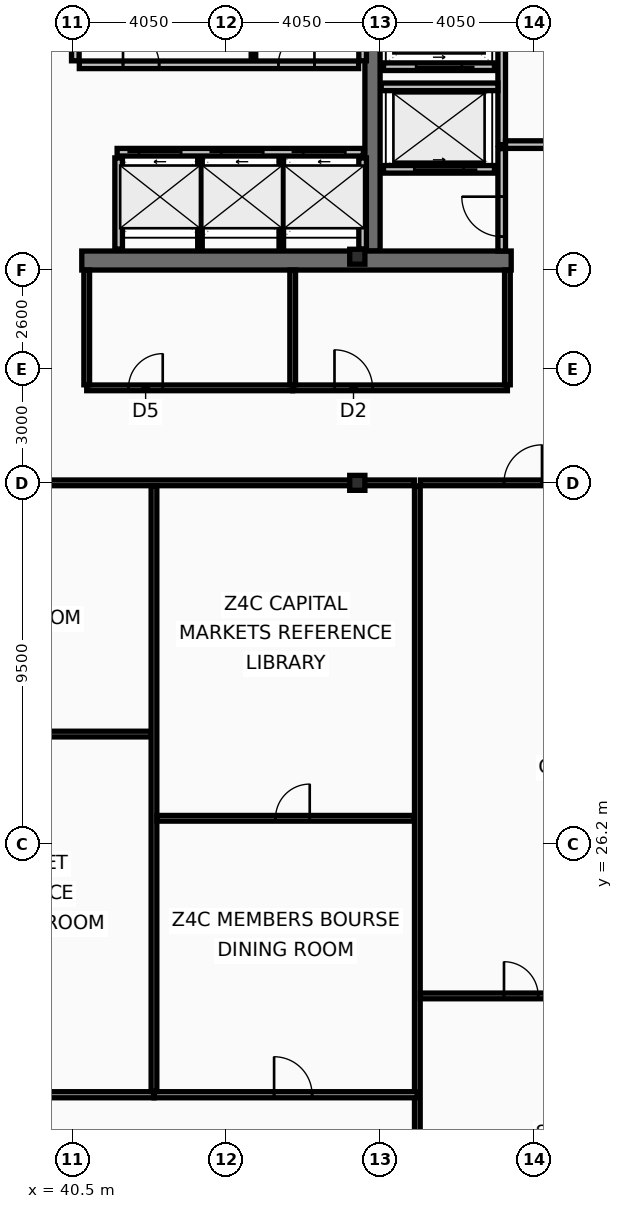
"""IFC4 building model, lengths in metres.
Left out: names, types, materials, properties, quantities, classifications, styles, units other than length and angle.
Written with IfcOpenShell. Run it as: python <this file> out.ifc"""

import sys

from ifc_helpers import new_model, si_unit, direction, frame, frame_2d, origin, origin_2d, place, context, subcontext, project, spatial, rectangle, i_section, extrude, element, fill, save


model = new_model("IFC4")
c1 = context("Model", 3, precision=1e-05, world=origin(), true_north=direction((0.0, 1.0)))
c2 = subcontext(c1, "Body", "Model", "MODEL_VIEW")
j1 = project(units=[si_unit("LENGTHUNIT", "METRE"), si_unit("PLANEANGLEUNIT", "RADIAN")], contexts=[c1])
p1 = place(None, origin())
s1 = spatial("IfcSite", under=j1, at=p1, CompositionType="ELEMENT")
p2 = place(p1, origin())
s2 = spatial("IfcBuilding", under=s1, at=p2, CompositionType="ELEMENT")
p3 = place(p2, frame((0.0, 0.0, 314.6)))
s3 = spatial("IfcBuildingStorey", under=s2, at=p3, CompositionType="ELEMENT", Elevation=314.6)
p4 = place(p3, frame((48.4, 41.8, 0.0), z_axis=(0.0, 0.0, 1.0), x_axis=(0.0, 1.0, 0.0)))
e1 = element("IfcWall", 1, at=p4, inside=s3, PredefinedType="SHEAR", context=c2, shape_type="SweptSolid", body=[
    extrude(rectangle(XDim=11.4, YDim=0.4, at=frame_2d((5.7, 0.0))), origin(), (0.0, 0.0, 1.0), 3.44),
])
p5 = place(p3, frame((52.05, 41.55, 0.0), z_axis=(0.0, 0.0, 1.0), x_axis=(-1.0, 0.0, 0.0)))
e2 = element("IfcWall", 2, at=p5, inside=s3, PredefinedType="SHEAR", context=c2, shape_type="SweptSolid", body=[
    extrude(rectangle(XDim=11.3, YDim=0.5, at=frame_2d((5.65, 0.0))), origin(), (0.0, 0.0, 1.0), 3.44),
])
for number, where, z_axis, x_axis in (
    (3, (48.0, 35.7, 0.0), (0.0, 0.0, 1.0), (1.0, 0.0, 0.0)),
    (4, (48.0, 41.65, 0.0), (0.0, 0.0, 1.0), (1.0, 0.0, 0.0)),
):
    element("IfcColumn", number, at=place(p3, frame(where, z_axis=z_axis, x_axis=x_axis)), inside=s3, PredefinedType="COLUMN", context=c2, shape_type="SweptSolid", body=[
        extrude(i_section(OverallWidth=0.399, OverallDepth=0.393, WebThickness=0.023, FlangeThickness=0.037, at=origin_2d()), origin(), (0.0, 0.0, 1.0), 3.6),
    ])
p6 = place(p3, frame((41.68, 44.4, 0.0), z_axis=(0.0, 0.0, 1.0), x_axis=(1.0, 0.0, 0.0)))
e5 = element("IfcWall", 5, at=p6, inside=s3, PredefinedType="PARTITIONING", context=c2, shape_type="SweptSolid", body=[
    extrude(rectangle(XDim=6.48, YDim=0.2, at=frame_2d((3.24, 0.0))), origin(), (0.0, 0.0, 1.0), 3.44),
])
p7 = place(p6, frame((0.58, 0.0, 0.0)))
e6 = element("IfcOpeningElement", 6, at=p7, cuts=e5, PredefinedType="OPENING", context=c2, shape_type="SweptSolid", body=[
    extrude(rectangle(XDim=1.1, YDim=2.18, at=frame_2d((0.55, 1.09))), frame((0.0, 0.11, 0.0), z_axis=(0.0, -1.0, 0.0), x_axis=(1.0, 0.0, 0.0)), (0.0, 0.0, 1.0), 0.22),
])
p8 = place(p6, frame((2.74, 0.0, 0.0)))
e7 = element("IfcOpeningElement", 7, at=p8, cuts=e5, PredefinedType="OPENING", context=c2, shape_type="SweptSolid", body=[
    extrude(rectangle(XDim=1.1, YDim=2.18, at=frame_2d((0.55, 1.09))), frame((0.0, 0.11, 0.0), z_axis=(0.0, -1.0, 0.0), x_axis=(1.0, 0.0, 0.0)), (0.0, 0.0, 1.0), 0.22),
])
p9 = place(p6, frame((4.9, 0.0, 0.0)))
e8 = element("IfcOpeningElement", 8, at=p9, cuts=e5, PredefinedType="OPENING", context=c2, shape_type="SweptSolid", body=[
    extrude(rectangle(XDim=1.1, YDim=2.18, at=frame_2d((0.55, 1.09))), frame((0.0, 0.11, 0.0), z_axis=(0.0, -1.0, 0.0), x_axis=(1.0, 0.0, 0.0)), (0.0, 0.0, 1.0), 0.22),
])
p10 = place(p3, frame((51.61, 43.95, 0.0), z_axis=(0.0, 0.0, 1.0), x_axis=(-1.0, 0.0, 0.0)))
e9 = element("IfcWall", 9, at=p10, inside=s3, PredefinedType="PARTITIONING", context=c2, shape_type="SweptSolid", body=[
    extrude(rectangle(XDim=2.92, YDim=0.2, at=frame_2d((1.46, 0.0))), origin(), (0.0, 0.0, 1.0), 3.44),
])
p11 = place(p10, frame((0.81, 0.0, 0.0)))
e10 = element("IfcOpeningElement", 10, at=p11, cuts=e9, PredefinedType="OPENING", context=c2, shape_type="SweptSolid", body=[
    extrude(rectangle(XDim=1.3, YDim=2.18, at=frame_2d((0.65, 1.09))), frame((0.0, 0.11, 0.0), z_axis=(0.0, -1.0, 0.0), x_axis=(1.0, 0.0, 0.0)), (0.0, 0.0, 1.0), 0.22),
])
p12 = place(p3, frame((51.61, 46.65, 0.0), z_axis=(0.0, 0.0, 1.0), x_axis=(-1.0, 0.0, 0.0)))
e11 = element("IfcWall", 11, at=p12, inside=s3, PredefinedType="PARTITIONING", context=c2, shape_type="SweptSolid", body=[
    extrude(rectangle(XDim=2.92, YDim=0.2, at=frame_2d((1.46, 0.0))), origin(), (0.0, 0.0, 1.0), 3.44),
])
p13 = place(p12, frame((0.86, 0.0, 0.0)))
e12 = element("IfcOpeningElement", 12, at=p13, cuts=e11, PredefinedType="OPENING", context=c2, shape_type="SweptSolid", body=[
    extrude(rectangle(XDim=1.2, YDim=2.18, at=frame_2d((0.6, 1.09))), frame((0.0, 0.11, 0.0), z_axis=(0.0, -1.0, 0.0), x_axis=(1.0, 0.0, 0.0)), (0.0, 0.0, 1.0), 0.22),
])
p14 = place(p3, frame((51.8, 44.6, 0.0), z_axis=(0.0, 0.0, 1.0), x_axis=(0.0, 1.0, 0.0)))
e13 = element("IfcWall", 13, at=p14, inside=s3, PredefinedType="PARTITIONING", context=c2, shape_type="SweptSolid", body=[
    extrude(rectangle(XDim=4.3, YDim=0.2, at=frame_2d((2.15, 0.0))), origin(), (0.0, 0.0, 1.0), 3.44),
])
p15 = place(p3, frame((51.9, 44.6, 0.0), z_axis=(0.0, 0.0, 1.0), x_axis=(1.0, 0.0, 0.0)))
e14 = element("IfcWall", 14, at=p15, inside=s3, PredefinedType="PARTITIONING", context=c2, shape_type="SweptSolid", body=[
    extrude(rectangle(XDim=4.3, YDim=0.2, at=frame_2d((2.15, 0.0))), origin(), (0.0, 0.0, 1.0), 3.44),
])
p16 = place(p15, frame((1.15, 0.0, 0.0)))
e15 = element("IfcOpeningElement", 15, at=p16, cuts=e14, PredefinedType="OPENING", context=c2, shape_type="SweptSolid", body=[
    extrude(rectangle(XDim=1.05, YDim=2.15, at=frame_2d((0.525, 1.075))), frame((0.0, 0.11, 0.0), z_axis=(0.0, -1.0, 0.0), x_axis=(1.0, 0.0, 0.0)), (0.0, 0.0, 1.0), 0.22),
])
p17 = place(p3, frame((48.63, 46.12, 0.0), z_axis=(0.0, 0.0, 1.0), x_axis=(1.0, 0.0, 0.0)))
e16 = element("IfcWall", 16, at=p17, inside=s3, PredefinedType="PARTITIONING", context=c2, shape_type="SweptSolid", body=[
    extrude(rectangle(XDim=3.07, YDim=0.2, at=frame_2d((1.535, 0.0))), origin(), (0.0, 0.0, 1.0), 3.44),
])
p18 = place(p3, frame((51.8, 41.8, 0.0), z_axis=(0.0, 0.0, 1.0), x_axis=(0.0, 1.0, 0.0)))
e17 = element("IfcWall", 17, at=p18, inside=s3, PredefinedType="PARTITIONING", context=c2, shape_type="SweptSolid", body=[
    extrude(rectangle(XDim=2.695, YDim=0.2, at=frame_2d((1.348, 0.0))), origin(), (0.0, 0.0, 1.0), 3.44),
])
p19 = place(p18, frame((0.38, 0.0, 0.0)))
e18 = element("IfcOpeningElement", 18, at=p19, cuts=e17, PredefinedType="OPENING", context=c2, shape_type="SweptSolid", body=[
    extrude(rectangle(XDim=1.05, YDim=2.15, at=frame_2d((0.525, 1.075))), frame((0.0, 0.11, 0.0), z_axis=(0.0, -1.0, 0.0), x_axis=(1.0, 0.0, 0.0)), (0.0, 0.0, 1.0), 0.22),
])
for number, where, z_axis, x_axis in (
    (19, (40.58, 46.805, 0.0), (0.0, 0.0, 1.0), (0.0, 1.0, 0.0)),
    (20, (48.14, 46.805, 0.0), (0.0, 0.0, 1.0), (0.0, 1.0, 0.0)),
):
    element("IfcWall", number, at=place(p3, frame(where, z_axis=z_axis, x_axis=x_axis)), inside=s3, PredefinedType="PARTITIONING", context=c2, shape_type="SweptSolid", body=[
        extrude(rectangle(XDim=5.99, YDim=0.2, at=frame_2d((2.995, 0.0))), origin(), (0.0, 0.0, 1.0), 3.44),
    ])
p20 = place(p3, frame((45.267, 46.805, 0.0), z_axis=(0.0, 0.0, 1.0), x_axis=(0.0, 1.0, 0.0)))
e21 = element("IfcWall", 21, at=p20, inside=s3, PredefinedType="PARTITIONING", context=c2, shape_type="SweptSolid", body=[
    extrude(rectangle(XDim=5.99, YDim=0.12, at=frame_2d((2.995, 0.0))), origin(), (0.0, 0.0, 1.0), 3.44),
])
p21 = place(p3, frame((40.685, 46.7, 0.0), z_axis=(0.0, 0.0, 1.0), x_axis=(1.0, 0.0, 0.0)))
e22 = element("IfcWall", 22, at=p21, inside=s3, PredefinedType="PARTITIONING", context=c2, shape_type="SweptSolid", body=[
    extrude(rectangle(XDim=7.35, YDim=0.2, at=frame_2d((3.675, 0.0))), origin(), (0.0, 0.0, 1.0), 3.44),
])
p22 = place(p21, frame((1.15, 0.0, 0.0)))
e23 = element("IfcOpeningElement", 23, at=p22, cuts=e22, PredefinedType="OPENING", context=c2, shape_type="SweptSolid", body=[
    extrude(rectangle(XDim=0.95, YDim=2.1, at=frame_2d((0.475, 1.05))), frame((0.0, 0.11, 0.0), z_axis=(0.0, -1.0, 0.0), x_axis=(1.0, 0.0, 0.0)), (0.0, 0.0, 1.0), 0.22),
])
p23 = place(p21, frame((5.237, 0.0, 0.0)))
e24 = element("IfcOpeningElement", 24, at=p23, cuts=e22, PredefinedType="OPENING", context=c2, shape_type="SweptSolid", body=[
    extrude(rectangle(XDim=0.95, YDim=2.1, at=frame_2d((0.475, 1.05))), frame((0.0, 0.11, 0.0), z_axis=(0.0, -1.0, 0.0), x_axis=(1.0, 0.0, 0.0)), (0.0, 0.0, 1.0), 0.22),
])
for number, where, z_axis, x_axis in (
    (25, (41.72, 41.85, 0.0), (0.0, 0.0, 1.0), (0.0, 1.0, 0.0)),
    (26, (48.14, 41.85, 0.0), (0.0, 0.0, 1.0), (0.0, 1.0, 0.0)),
):
    element("IfcWall", number, at=place(p3, frame(where, z_axis=z_axis, x_axis=x_axis)), inside=s3, PredefinedType="PARTITIONING", context=c2, shape_type="SweptSolid", body=[
        extrude(rectangle(XDim=2.4, YDim=0.2, at=frame_2d((1.2, 0.0))), origin(), (0.0, 0.0, 1.0), 3.44),
    ])
for number, where, z_axis, x_axis in (
    (27, (43.86, 41.85, 0.0), (0.0, 0.0, 1.0), (0.0, 1.0, 0.0)),
    (28, (46.0, 41.85, 0.0), (0.0, 0.0, 1.0), (0.0, 1.0, 0.0)),
):
    element("IfcWall", number, at=place(p3, frame(where, z_axis=z_axis, x_axis=x_axis)), inside=s3, PredefinedType="PARTITIONING", context=c2, shape_type="SweptSolid", body=[
        extrude(rectangle(XDim=2.4, YDim=0.12, at=frame_2d((1.2, 0.0))), origin(), (0.0, 0.0, 1.0), 3.44),
    ])
p24 = place(p3, frame((40.88, 38.2, 0.0), z_axis=(0.0, 0.0, 1.0), x_axis=(1.0, 0.0, 0.0)))
e29 = element("IfcWall", 29, at=p24, inside=s3, PredefinedType="PARTITIONING", context=c2, shape_type="SweptSolid", body=[
    extrude(rectangle(XDim=5.42, YDim=0.15, at=frame_2d((2.71, 0.0))), origin(), (0.0, 0.0, 1.0), 3.44),
])
p25 = place(p24, frame((1.1, 0.0, 0.0)))
e30 = element("IfcOpeningElement", 30, at=p25, cuts=e29, PredefinedType="OPENING", context=c2, shape_type="SweptSolid", body=[
    extrude(rectangle(XDim=0.9, YDim=2.05, at=frame_2d((0.45, 1.025))), frame((0.0, 0.085, 0.0), z_axis=(0.0, -1.0, 0.0), x_axis=(1.0, 0.0, 0.0)), (0.0, 0.0, 1.0), 0.17),
])
p26 = place(p3, frame((46.3, 38.2, 0.0), z_axis=(0.0, 0.0, 1.0), x_axis=(1.0, 0.0, 0.0)))
e31 = element("IfcWall", 31, at=p26, inside=s3, PredefinedType="PARTITIONING", context=c2, shape_type="SweptSolid", body=[
    extrude(rectangle(XDim=5.65, YDim=0.15, at=frame_2d((2.825, 0.0))), origin(), (0.0, 0.0, 1.0), 2.83),
])
p27 = place(p26, frame((1.1, 0.0, 0.0)))
e32 = element("IfcOpeningElement", 32, at=p27, cuts=e31, PredefinedType="OPENING", context=c2, shape_type="SweptSolid", body=[
    extrude(rectangle(XDim=1.0, YDim=2.05, at=frame_2d((0.5, 1.025))), frame((0.0, 0.085, 0.0), z_axis=(0.0, -1.0, 0.0), x_axis=(1.0, 0.0, 0.0)), (0.0, 0.0, 1.0), 0.17),
])
for number, where, z_axis, x_axis in (
    (33, (40.88, 38.28, 0.0), (0.0, 0.0, 1.0), (0.0, 1.0, 0.0)),
    (34, (46.3, 38.28, 0.0), (0.0, 0.0, 1.0), (0.0, 1.0, 0.0)),
    (35, (51.95, 38.28, 0.0), (0.0, 0.0, 1.0), (0.0, 1.0, 0.0)),
):
    element("IfcWall", number, at=place(p3, frame(where, z_axis=z_axis, x_axis=x_axis)), inside=s3, PredefinedType="PARTITIONING", context=c2, shape_type="SweptSolid", body=[
        extrude(rectangle(XDim=3.02, YDim=0.15, at=frame_2d((1.51, 0.0))), origin(), (0.0, 0.0, 1.0), 3.44),
    ])
p28 = place(p3, frame((49.58, 10.665, 0.0), z_axis=(0.0, 0.0, 1.0), x_axis=(0.0, 1.0, 0.0)))
e36 = element("IfcWall", 36, at=p28, inside=s3, PredefinedType="PARTITIONING", context=c2, shape_type="SweptSolid", body=[
    extrude(rectangle(XDim=24.955, YDim=0.15, at=frame_2d((12.478, 0.0))), origin(), (0.0, 0.0, 1.0), 3.07),
])
p29 = place(p28, frame((3.2, 0.0, 0.0)))
e37 = element("IfcOpeningElement", 37, at=p29, cuts=e36, PredefinedType="OPENING", context=c2, shape_type="SweptSolid", body=[
    extrude(rectangle(XDim=1.1, YDim=2.1, at=frame_2d((0.55, 1.05))), frame((0.0, 0.085, 0.0), z_axis=(0.0, -1.0, 0.0), x_axis=(1.0, 0.0, 0.0)), (0.0, 0.0, 1.0), 0.17),
])
p30 = place(p3, frame((24.48, 35.7, 0.0), z_axis=(0.0, 0.0, 1.0), x_axis=(1.0, 0.0, 0.0)))
e38 = element("IfcWall", 38, at=p30, inside=s3, PredefinedType="PARTITIONING", context=c2, shape_type="SweptSolid", body=[
    extrude(rectangle(XDim=25.02, YDim=0.15, at=frame_2d((12.51, 0.0))), origin(), (0.0, 0.0, 1.0), 2.83),
])
p31 = place(p3, frame((49.66, 35.7, 0.0), z_axis=(0.0, 0.0, 1.0), x_axis=(1.0, 0.0, 0.0)))
e39 = element("IfcWall", 39, at=p31, inside=s3, PredefinedType="PARTITIONING", context=c2, shape_type="SweptSolid", body=[
    extrude(rectangle(XDim=11.145, YDim=0.15, at=frame_2d((5.573, 0.0))), origin(), (0.0, 0.0, 1.0), 2.83),
])
p32 = place(p31, frame((2.2, 0.0, 0.0)))
e40 = element("IfcOpeningElement", 40, at=p32, cuts=e39, PredefinedType="OPENING", context=c2, shape_type="SweptSolid", body=[
    extrude(rectangle(XDim=1.0, YDim=2.05, at=frame_2d((0.5, 1.025))), frame((0.0, 0.085, 0.0), z_axis=(0.0, -1.0, 0.0), x_axis=(1.0, 0.0, 0.0)), (0.0, 0.0, 1.0), 0.17),
])
p33 = place(p3, frame((49.66, 22.2, 0.0), z_axis=(0.0, 0.0, 1.0), x_axis=(1.0, 0.0, 0.0)))
e41 = element("IfcWall", 41, at=p33, inside=s3, PredefinedType="PARTITIONING", context=c2, shape_type="SweptSolid", body=[
    extrude(rectangle(XDim=11.145, YDim=0.15, at=frame_2d((5.573, 0.0))), origin(), (0.0, 0.0, 1.0), 2.83),
])
p34 = place(p33, frame((2.2, 0.0, 0.0)))
e42 = element("IfcOpeningElement", 42, at=p34, cuts=e41, PredefinedType="OPENING", context=c2, shape_type="SweptSolid", body=[
    extrude(rectangle(XDim=0.9, YDim=2.05, at=frame_2d((0.45, 1.025))), frame((0.0, 0.085, 0.0), z_axis=(0.0, -1.0, 0.0), x_axis=(1.0, 0.0, 0.0)), (0.0, 0.0, 1.0), 0.17),
])
p35 = place(p3, frame((34.832, 19.6, 0.0), z_axis=(0.0, 0.0, 1.0), x_axis=(1.0, 0.0, 0.0)))
e43 = element("IfcWall", 43, at=p35, inside=s3, PredefinedType="PARTITIONING", context=c2, shape_type="SweptSolid", body=[
    extrude(rectangle(XDim=7.818, YDim=0.16, at=frame_2d((3.909, 0.0))), origin(), (0.0, 0.0, 1.0), 3.44),
])
p36 = place(p35, frame((3.534, 0.0, 0.0)))
e44 = element("IfcOpeningElement", 44, at=p36, cuts=e43, PredefinedType="OPENING", context=c2, shape_type="SweptSolid", body=[
    extrude(rectangle(XDim=1.0, YDim=2.05, at=frame_2d((0.5, 1.025))), frame((0.0, 0.09, 0.0), z_axis=(0.0, -1.0, 0.0), x_axis=(1.0, 0.0, 0.0)), (0.0, 0.0, 1.0), 0.18),
])
p37 = place(p3, frame((34.912, 29.09, 0.0), z_axis=(0.0, 0.0, 1.0), x_axis=(1.0, 0.0, 0.0)))
e45 = element("IfcWall", 45, at=p37, inside=s3, PredefinedType="PARTITIONING", context=c2, shape_type="SweptSolid", body=[
    extrude(rectangle(XDim=7.658, YDim=0.15, at=frame_2d((3.829, 0.0))), origin(), (0.0, 0.0, 1.0), 3.44),
])
p38 = place(p37, frame((3.518, 0.0, 0.0)))
e46 = element("IfcOpeningElement", 46, at=p38, cuts=e45, PredefinedType="OPENING", context=c2, shape_type="SweptSolid", body=[
    extrude(rectangle(XDim=0.9, YDim=2.05, at=frame_2d((0.45, 1.025))), frame((0.0, 0.085, 0.0), z_axis=(0.0, -1.0, 0.0), x_axis=(1.0, 0.0, 0.0)), (0.0, 0.0, 1.0), 0.17),
])
p39 = place(p3, frame((42.65, 19.6, 0.0), z_axis=(0.0, 0.0, 1.0), x_axis=(1.0, 0.0, 0.0)))
e47 = element("IfcWall", 47, at=p39, inside=s3, PredefinedType="PARTITIONING", context=c2, shape_type="SweptSolid", body=[
    extrude(rectangle(XDim=6.93, YDim=0.16, at=frame_2d((3.465, 0.0))), origin(), (0.0, 0.0, 1.0), 2.83),
])
p40 = place(p39, frame((3.161, 0.0, 0.0)))
e48 = element("IfcOpeningElement", 48, at=p40, cuts=e47, PredefinedType="OPENING", context=c2, shape_type="SweptSolid", body=[
    extrude(rectangle(XDim=1.0, YDim=2.05, at=frame_2d((0.5, 1.025))), frame((0.0, 0.09, 0.0), z_axis=(0.0, -1.0, 0.0), x_axis=(1.0, 0.0, 0.0)), (0.0, 0.0, 1.0), 0.18),
])
p41 = place(p3, frame((42.65, 19.685, 0.0), z_axis=(0.0, 0.0, 1.0), x_axis=(0.0, 1.0, 0.0)))
e49 = element("IfcWall", 49, at=p41, inside=s3, PredefinedType="PARTITIONING", context=c2, shape_type="SweptSolid", body=[
    extrude(rectangle(XDim=15.935, YDim=0.15, at=frame_2d((7.968, 0.0))), origin(), (0.0, 0.0, 1.0), 3.07),
])
p42 = place(p3, frame((42.73, 26.874, 0.0), z_axis=(0.0, 0.0, 1.0), x_axis=(1.0, 0.0, 0.0)))
e50 = element("IfcWall", 50, at=p42, inside=s3, PredefinedType="PARTITIONING", context=c2, shape_type="SweptSolid", body=[
    extrude(rectangle(XDim=6.77, YDim=0.15, at=frame_2d((3.385, 0.0))), origin(), (0.0, 0.0, 1.0), 2.83),
])
p43 = place(p42, frame((3.119, 0.0, 0.0)))
e51 = element("IfcOpeningElement", 51, at=p43, cuts=e50, PredefinedType="OPENING", context=c2, shape_type="SweptSolid", body=[
    extrude(rectangle(XDim=0.9, YDim=2.05, at=frame_2d((0.45, 1.025))), frame((0.0, 0.085, 0.0), z_axis=(0.0, -1.0, 0.0), x_axis=(1.0, 0.0, 0.0)), (0.0, 0.0, 1.0), 0.17),
])
p44 = place(p7, origin())
e52 = element("IfcDoor", 52, at=p44, inside=s3, OperationType="SLIDING_TO_LEFT", PredefinedType="DOOR", context=c2, shape_type="SweptSolid", body=[
    extrude(rectangle(XDim=1.1, YDim=2.18, at=frame_2d((0.55, 1.09))), frame((0.0, 0.025, 0.0), z_axis=(0.0, -1.0, 0.0), x_axis=(1.0, 0.0, 0.0)), (0.0, 0.0, 1.0), 0.05),
])
fill(e6, e52)
p45 = place(p8, origin())
e53 = element("IfcDoor", 53, at=p45, inside=s3, OperationType="SLIDING_TO_LEFT", PredefinedType="DOOR", context=c2, shape_type="SweptSolid", body=[
    extrude(rectangle(XDim=1.1, YDim=2.18, at=frame_2d((0.55, 1.09))), frame((0.0, 0.025, 0.0), z_axis=(0.0, -1.0, 0.0), x_axis=(1.0, 0.0, 0.0)), (0.0, 0.0, 1.0), 0.05),
])
fill(e7, e53)
p46 = place(p9, origin())
e54 = element("IfcDoor", 54, at=p46, inside=s3, OperationType="SLIDING_TO_LEFT", PredefinedType="DOOR", context=c2, shape_type="SweptSolid", body=[
    extrude(rectangle(XDim=1.1, YDim=2.18, at=frame_2d((0.55, 1.09))), frame((0.0, 0.025, 0.0), z_axis=(0.0, -1.0, 0.0), x_axis=(1.0, 0.0, 0.0)), (0.0, 0.0, 1.0), 0.05),
])
fill(e8, e54)
p47 = place(p11, origin())
e55 = element("IfcDoor", 55, at=p47, inside=s3, OperationType="SLIDING_TO_LEFT", PredefinedType="DOOR", context=c2, shape_type="SweptSolid", body=[
    extrude(rectangle(XDim=1.3, YDim=2.18, at=frame_2d((0.65, 1.09))), frame((0.0, 0.025, 0.0), z_axis=(0.0, -1.0, 0.0), x_axis=(1.0, 0.0, 0.0)), (0.0, 0.0, 1.0), 0.05),
])
fill(e10, e55)
p48 = place(p13, origin())
e56 = element("IfcDoor", 56, at=p48, inside=s3, OperationType="SLIDING_TO_LEFT", PredefinedType="DOOR", context=c2, shape_type="SweptSolid", body=[
    extrude(rectangle(XDim=1.2, YDim=2.18, at=frame_2d((0.6, 1.09))), frame((0.0, 0.025, 0.0), z_axis=(0.0, -1.0, 0.0), x_axis=(1.0, 0.0, 0.0)), (0.0, 0.0, 1.0), 0.05),
])
fill(e12, e56)
p49 = place(p19, origin())
e57 = element("IfcDoor", 57, at=p49, inside=s3, OperationType="SINGLE_SWING_RIGHT", PredefinedType="DOOR", context=c2, shape_type="SweptSolid", body=[
    extrude(rectangle(XDim=1.05, YDim=2.15, at=frame_2d((0.525, 1.075))), frame((0.0, 0.025, 0.0), z_axis=(0.0, -1.0, 0.0), x_axis=(1.0, 0.0, 0.0)), (0.0, 0.0, 1.0), 0.05),
])
fill(e18, e57)
p50 = place(p22, origin())
e58 = element("IfcDoor", 58, at=p50, inside=s3, OperationType="SINGLE_SWING_LEFT", PredefinedType="DOOR", context=c2, shape_type="SweptSolid", body=[
    extrude(rectangle(XDim=0.95, YDim=2.1, at=frame_2d((0.475, 1.05))), frame((0.0, 0.025, 0.0), z_axis=(0.0, -1.0, 0.0), x_axis=(1.0, 0.0, 0.0)), (0.0, 0.0, 1.0), 0.05),
])
fill(e23, e58)
p51 = place(p23, origin())
e59 = element("IfcDoor", 59, at=p51, inside=s3, OperationType="SINGLE_SWING_RIGHT", PredefinedType="DOOR", context=c2, shape_type="SweptSolid", body=[
    extrude(rectangle(XDim=0.95, YDim=2.1, at=frame_2d((0.475, 1.05))), frame((0.0, 0.025, 0.0), z_axis=(0.0, -1.0, 0.0), x_axis=(1.0, 0.0, 0.0)), (0.0, 0.0, 1.0), 0.05),
])
fill(e24, e59)
p52 = place(p25, origin())
e60 = element("IfcDoor", 60, at=p52, inside=s3, OperationType="SINGLE_SWING_RIGHT", PredefinedType="DOOR", context=c2, shape_type="SweptSolid", body=[
    extrude(rectangle(XDim=0.9, YDim=2.05, at=frame_2d((0.45, 1.025))), frame((0.0, 0.025, 0.0), z_axis=(0.0, -1.0, 0.0), x_axis=(1.0, 0.0, 0.0)), (0.0, 0.0, 1.0), 0.05),
])
fill(e30, e60)
p53 = place(p27, origin())
e61 = element("IfcDoor", 61, at=p53, inside=s3, OperationType="SINGLE_SWING_LEFT", PredefinedType="DOOR", context=c2, shape_type="SweptSolid", body=[
    extrude(rectangle(XDim=1.0, YDim=2.05, at=frame_2d((0.5, 1.025))), frame((0.0, 0.025, 0.0), z_axis=(0.0, -1.0, 0.0), x_axis=(1.0, 0.0, 0.0)), (0.0, 0.0, 1.0), 0.05),
])
fill(e32, e61)
p54 = place(p32, origin())
e62 = element("IfcDoor", 62, at=p54, inside=s3, OperationType="SINGLE_SWING_RIGHT", PredefinedType="DOOR", context=c2, shape_type="SweptSolid", body=[
    extrude(rectangle(XDim=1.0, YDim=2.05, at=frame_2d((0.5, 1.025))), frame((0.0, 0.025, 0.0), z_axis=(0.0, -1.0, 0.0), x_axis=(1.0, 0.0, 0.0)), (0.0, 0.0, 1.0), 0.05),
])
fill(e40, e62)
p55 = place(p34, origin())
e63 = element("IfcDoor", 63, at=p55, inside=s3, OperationType="SINGLE_SWING_LEFT", PredefinedType="DOOR", context=c2, shape_type="SweptSolid", body=[
    extrude(rectangle(XDim=0.9, YDim=2.05, at=frame_2d((0.45, 1.025))), frame((0.0, 0.025, 0.0), z_axis=(0.0, -1.0, 0.0), x_axis=(1.0, 0.0, 0.0)), (0.0, 0.0, 1.0), 0.05),
])
fill(e42, e63)
p56 = place(p40, origin())
e64 = element("IfcDoor", 64, at=p56, inside=s3, OperationType="SINGLE_SWING_LEFT", PredefinedType="DOOR", context=c2, shape_type="SweptSolid", body=[
    extrude(rectangle(XDim=1.0, YDim=2.05, at=frame_2d((0.5, 1.025))), frame((0.0, 0.025, 0.0), z_axis=(0.0, -1.0, 0.0), x_axis=(1.0, 0.0, 0.0)), (0.0, 0.0, 1.0), 0.05),
])
fill(e48, e64)
p57 = place(p43, origin())
e65 = element("IfcDoor", 65, at=p57, inside=s3, OperationType="SINGLE_SWING_RIGHT", PredefinedType="DOOR", context=c2, shape_type="SweptSolid", body=[
    extrude(rectangle(XDim=0.9, YDim=2.05, at=frame_2d((0.45, 1.025))), frame((0.0, 0.025, 0.0), z_axis=(0.0, -1.0, 0.0), x_axis=(1.0, 0.0, 0.0)), (0.0, 0.0, 1.0), 0.05),
])
fill(e51, e65)
save(model, sys.argv[1])
